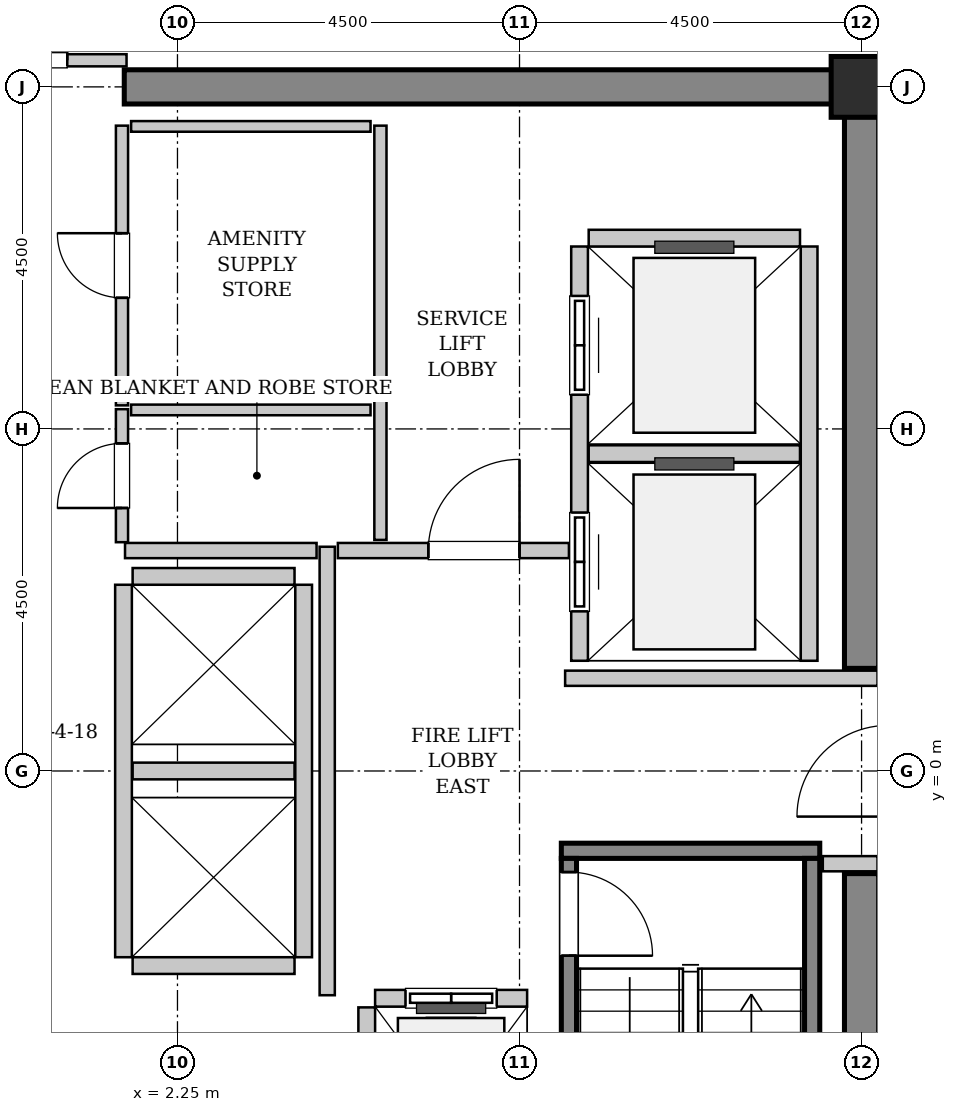
"""IFC4 building model, lengths in metres.
Left out: names, types, materials, properties, quantities, classifications, styles, units other than length and angle.
Written with IfcOpenShell. Run it as: python <this file> out.ifc"""

import sys

from ifc_helpers import new_model, si_unit, direction, frame, frame_2d, origin, origin_2d, place, context, subcontext, project, spatial, rectangle, hollow_rectangle, extrude, source, transform, mapped, element, fill, save


model = new_model("IFC4")
c1 = context("Model", 3, precision=1e-05, world=origin(), true_north=direction((0.0, 1.0)))
c2 = subcontext(c1, "Body", "Model", "MODEL_VIEW")
j1 = project(units=[si_unit("LENGTHUNIT", "METRE"), si_unit("PLANEANGLEUNIT", "RADIAN")], contexts=[c1])
p1 = place(None, origin())
s1 = spatial("IfcSite", under=j1, at=p1, CompositionType="ELEMENT")
p2 = place(p1, origin())
s2 = spatial("IfcBuilding", under=s1, at=p2, CompositionType="ELEMENT")
p3 = place(p2, frame((0.0, 0.0, 252.2)))
s3 = spatial("IfcBuildingStorey", under=s2, at=p3, CompositionType="ELEMENT", Elevation=252.2)
m1 = source(origin(), c2, "Body", "SweptSolid", [
    extrude(rectangle(XDim=9.925, YDim=0.45, at=frame_2d((4.962, 0.0))), origin(), (0.0, 0.0, 1.0), 3.8),
])
p4 = place(p3, frame((1.55, 9.0, 0.0), z_axis=(0.0, 0.0, 1.0), x_axis=(1.0, 0.0, 0.0)))
e1 = element("IfcWall", 1, at=p4, inside=s3, PredefinedType="SHEAR", context=c2, shape_type="MappedRepresentation", body=[
    mapped(m1, transform((0.0, 0.0, 0.0), x_axis=(1.0, 0.0, 0.0), y_axis=(0.0, 1.0, 0.0), z_axis=(0.0, 0.0, 1.0), scale=1.0)),
])
m2 = source(origin(), c2, "Body", "SweptSolid", [
    extrude(rectangle(XDim=7.425, YDim=0.45, at=frame_2d((3.712, 0.0))), origin(), (0.0, 0.0, 1.0), 3.8),
])
for number, where, z_axis, x_axis in (
    (2, (11.25, -8.775, 0.0), (0.0, 0.0, 1.0), (0.0, 1.0, 0.0)),
    (3, (11.25, 1.35, 0.0), (0.0, 0.0, 1.0), (0.0, 1.0, 0.0)),
):
    element("IfcWall", number, at=place(p3, frame(where, z_axis=z_axis, x_axis=x_axis)), inside=s3, PredefinedType="SHEAR", context=c2, shape_type="MappedRepresentation", body=[
        mapped(m2, transform((0.0, 0.0, 0.0), x_axis=(1.0, 0.0, 0.0), y_axis=(0.0, 1.0, 0.0), z_axis=(0.0, 0.0, 1.0), scale=1.0)),
    ])
m3 = source(origin(), c2, "Body", "SweptSolid", [
    extrude(hollow_rectangle(XDim=0.8, YDim=0.8, WallThickness=0.04, InnerFilletRadius=0.04, OuterFilletRadius=0.08, at=origin_2d()), origin(), (0.0, 0.0, 1.0), 3.8),
])
p5 = place(p3, frame((11.25, 9.0, 0.0), z_axis=(0.0, 0.0, 1.0), x_axis=(1.0, 0.0, 0.0)))
e4 = element("IfcColumn", 4, at=p5, inside=s3, PredefinedType="COLUMN", context=c2, shape_type="MappedRepresentation", body=[
    mapped(m3, transform((0.0, 0.0, 0.0), x_axis=(1.0, 0.0, 0.0), y_axis=(0.0, 1.0, 0.0), z_axis=(0.0, 0.0, 1.0), scale=1.0)),
])
m4 = source(origin(), c2, "Body", "SweptSolid", [
    extrude(rectangle(XDim=3.4, YDim=0.2, at=frame_2d((1.7, 0.0))), origin(), (0.0, 0.0, 1.0), 3.8),
])
p6 = place(p3, frame((7.3, -1.05, 0.0), z_axis=(0.0, 0.0, 1.0), x_axis=(1.0, 0.0, 0.0)))
e5 = element("IfcWall", 5, at=p6, inside=s3, PredefinedType="SOLIDWALL", context=c2, shape_type="MappedRepresentation", body=[
    mapped(m4, transform((0.0, 0.0, 0.0), x_axis=(1.0, 0.0, 0.0), y_axis=(0.0, 1.0, 0.0), z_axis=(0.0, 0.0, 1.0), scale=1.0)),
])
m5 = source(origin(), c2, "Body", "SweptSolid", [
    extrude(rectangle(XDim=7.1, YDim=0.2, at=frame_2d((3.55, 0.0))), origin(), (0.0, 0.0, 1.0), 3.8),
])
p7 = place(p3, frame((7.4, -1.15, 0.0), z_axis=(0.0, 0.0, 1.0), x_axis=(0.0, -1.0, 0.0)))
e6 = element("IfcWall", 6, at=p7, inside=s3, PredefinedType="SOLIDWALL", context=c2, shape_type="MappedRepresentation", body=[
    mapped(m5, transform((0.0, 0.0, 0.0), x_axis=(1.0, 0.0, 0.0), y_axis=(0.0, 1.0, 0.0), z_axis=(0.0, 0.0, 1.0), scale=1.0)),
])
p8 = place(p7, frame((0.18, 0.0, 0.0)))
e7 = element("IfcOpeningElement", 7, at=p8, cuts=e6, PredefinedType="OPENING", context=c2, shape_type="SweptSolid", body=[
    extrude(rectangle(XDim=1.1, YDim=2.15, at=frame_2d((0.55, 1.075))), frame((0.0, 0.11, 0.0), z_axis=(0.0, -1.0, 0.0), x_axis=(1.0, 0.0, 0.0)), (0.0, 0.0, 1.0), 0.22),
])
p9 = place(p3, frame((10.6, -1.15, 0.0), z_axis=(0.0, 0.0, 1.0), x_axis=(0.0, -1.0, 0.0)))
e8 = element("IfcWall", 8, at=p9, inside=s3, PredefinedType="SOLIDWALL", context=c2, shape_type="MappedRepresentation", body=[
    mapped(m5, transform((0.0, 0.0, 0.0), x_axis=(1.0, 0.0, 0.0), y_axis=(0.0, 1.0, 0.0), z_axis=(0.0, 0.0, 1.0), scale=1.0)),
])
m6 = source(origin(), c2, "Body", "SweptSolid", [
    extrude(rectangle(XDim=2.0, YDim=0.22, at=frame_2d((1.0, 0.0))), origin(), (0.0, 0.0, 1.0), 3.535),
])
p10 = place(p3, frame((6.85, -2.99, 0.0), z_axis=(0.0, 0.0, 1.0), x_axis=(-1.0, 0.0, 0.0)))
e9 = element("IfcWall", 9, at=p10, inside=s3, PredefinedType="SOLIDWALL", context=c2, shape_type="MappedRepresentation", body=[
    mapped(m6, transform((0.0, 0.0, 0.0), x_axis=(1.0, 0.0, 0.0), y_axis=(0.0, 1.0, 0.0), z_axis=(0.0, 0.0, 1.0), scale=1.0)),
])
p11 = place(p10, frame((0.4, 0.0, 0.0)))
e10 = element("IfcOpeningElement", 10, at=p11, cuts=e9, PredefinedType="OPENING", context=c2, shape_type="SweptSolid", body=[
    extrude(rectangle(XDim=1.2, YDim=2.2, at=frame_2d((0.6, 1.1))), frame((0.0, 0.12, 0.0), z_axis=(0.0, -1.0, 0.0), x_axis=(1.0, 0.0, 0.0)), (0.0, 0.0, 1.0), 0.24),
])
m7 = source(origin(), c2, "Body", "SweptSolid", [
    extrude(rectangle(XDim=2.68, YDim=0.22, at=frame_2d((1.34, 0.0))), origin(), (0.0, 0.0, 1.0), 3.535),
])
p12 = place(p3, frame((4.74, -3.11, 0.0), z_axis=(0.0, 0.0, 1.0), x_axis=(0.0, -1.0, 0.0)))
e11 = element("IfcWall", 11, at=p12, inside=s3, PredefinedType="SOLIDWALL", context=c2, shape_type="MappedRepresentation", body=[
    mapped(m7, transform((0.0, 0.0, 0.0), x_axis=(1.0, 0.0, 0.0), y_axis=(0.0, 1.0, 0.0), z_axis=(0.0, 0.0, 1.0), scale=1.0)),
])
m8 = source(origin(), c2, "Body", "SweptSolid", [
    extrude(rectangle(XDim=5.45, YDim=0.22, at=frame_2d((2.725, 0.0))), origin(), (0.0, 0.0, 1.0), 3.535),
])
p13 = place(p3, frame((7.54, 6.9, 0.0), z_axis=(0.0, 0.0, 1.0), x_axis=(0.0, -1.0, 0.0)))
e12 = element("IfcWall", 12, at=p13, inside=s3, PredefinedType="SOLIDWALL", context=c2, shape_type="MappedRepresentation", body=[
    mapped(m8, transform((0.0, 0.0, 0.0), x_axis=(1.0, 0.0, 0.0), y_axis=(0.0, 1.0, 0.0), z_axis=(0.0, 0.0, 1.0), scale=1.0)),
])
p14 = place(p13, frame((3.5, 0.0, 0.0)))
e13 = element("IfcOpeningElement", 13, at=p14, cuts=e12, PredefinedType="OPENING", context=c2, shape_type="SweptSolid", body=[
    extrude(rectangle(XDim=1.3, YDim=2.3, at=frame_2d((0.65, 1.15))), frame((0.0, 0.12, 0.0), z_axis=(0.0, -1.0, 0.0), x_axis=(1.0, 0.0, 0.0)), (0.0, 0.0, 1.0), 0.24),
])
p15 = place(p13, frame((0.65, 0.0, 0.0)))
e14 = element("IfcOpeningElement", 14, at=p15, cuts=e12, PredefinedType="OPENING", context=c2, shape_type="SweptSolid", body=[
    extrude(rectangle(XDim=1.3, YDim=2.3, at=frame_2d((0.65, 1.15))), frame((0.0, 0.12, 0.0), z_axis=(0.0, -1.0, 0.0), x_axis=(1.0, 0.0, 0.0)), (0.0, 0.0, 1.0), 0.24),
])
p16 = place(p3, frame((10.56, 1.45, 0.0), z_axis=(0.0, 0.0, 1.0), x_axis=(0.0, 1.0, 0.0)))
e15 = element("IfcWall", 15, at=p16, inside=s3, PredefinedType="SOLIDWALL", context=c2, shape_type="MappedRepresentation", body=[
    mapped(m8, transform((0.0, 0.0, 0.0), x_axis=(1.0, 0.0, 0.0), y_axis=(0.0, 1.0, 0.0), z_axis=(0.0, 0.0, 1.0), scale=1.0)),
])
m9 = source(origin(), c2, "Body", "SweptSolid", [
    extrude(rectangle(XDim=2.78, YDim=0.22, at=frame_2d((1.39, 0.0))), origin(), (0.0, 0.0, 1.0), 3.535),
])
for number, where, z_axis, x_axis in (
    (16, (7.66, 4.175, 0.0), (0.0, 0.0, 1.0), (1.0, 0.0, 0.0)),
    (17, (10.44, 7.01, 0.0), (0.0, 0.0, 1.0), (-1.0, 0.0, 0.0)),
):
    element("IfcWall", number, at=place(p3, frame(where, z_axis=z_axis, x_axis=x_axis)), inside=s3, PredefinedType="SOLIDWALL", context=c2, shape_type="MappedRepresentation", body=[
        mapped(m9, transform((0.0, 0.0, 0.0), x_axis=(1.0, 0.0, 0.0), y_axis=(0.0, 1.0, 0.0), z_axis=(0.0, 0.0, 1.0), scale=1.0)),
    ])
m10 = source(origin(), c2, "Body", "SweptSolid", [
    extrude(rectangle(XDim=4.9, YDim=0.22, at=frame_2d((2.45, 0.0))), origin(), (0.0, 0.0, 1.0), 3.535),
])
for number, where, z_axis, x_axis in (
    (18, (1.54, 2.45, 0.0), (0.0, 0.0, 1.0), (0.0, -1.0, 0.0)),
    (19, (3.91, -2.45, 0.0), (0.0, 0.0, 1.0), (0.0, 1.0, 0.0)),
):
    element("IfcWall", number, at=place(p3, frame(where, z_axis=z_axis, x_axis=x_axis)), inside=s3, PredefinedType="SOLIDWALL", context=c2, shape_type="MappedRepresentation", body=[
        mapped(m10, transform((0.0, 0.0, 0.0), x_axis=(1.0, 0.0, 0.0), y_axis=(0.0, 1.0, 0.0), z_axis=(0.0, 0.0, 1.0), scale=1.0)),
    ])
m11 = source(origin(), c2, "Body", "SweptSolid", [
    extrude(rectangle(XDim=2.13, YDim=0.22, at=frame_2d((1.065, 0.0))), origin(), (0.0, 0.0, 1.0), 3.535),
])
for number, where, z_axis, x_axis in (
    (20, (1.66, -2.56, 0.0), (0.0, 0.0, 1.0), (1.0, 0.0, 0.0)),
    (21, (1.66, 0.0, 0.0), (0.0, 0.0, 1.0), (1.0, 0.0, 0.0)),
    (22, (3.79, 2.56, 0.0), (0.0, 0.0, 1.0), (-1.0, 0.0, 0.0)),
):
    element("IfcWall", number, at=place(p3, frame(where, z_axis=z_axis, x_axis=x_axis)), inside=s3, PredefinedType="SOLIDWALL", context=c2, shape_type="MappedRepresentation", body=[
        mapped(m11, transform((0.0, 0.0, 0.0), x_axis=(1.0, 0.0, 0.0), y_axis=(0.0, 1.0, 0.0), z_axis=(0.0, 0.0, 1.0), scale=1.0)),
    ])
m12 = source(origin(), c2, "Body", "SweptSolid", [
    extrude(rectangle(XDim=5.9, YDim=0.2, at=frame_2d((2.95, 0.0))), origin(), (0.0, 0.0, 1.0), 3.535),
])
p17 = place(p3, frame((4.22, -2.95, 0.0), z_axis=(0.0, 0.0, 1.0), x_axis=(0.0, 1.0, 0.0)))
e23 = element("IfcWall", 23, at=p17, inside=s3, PredefinedType="PARTITIONING", context=c2, shape_type="MappedRepresentation", body=[
    mapped(m12, transform((0.0, 0.0, 0.0), x_axis=(1.0, 0.0, 0.0), y_axis=(0.0, 1.0, 0.0), z_axis=(0.0, 0.0, 1.0), scale=1.0)),
])
m13 = source(origin(), c2, "Body", "SweptSolid", [
    extrude(rectangle(XDim=2.52, YDim=0.2, at=frame_2d((1.26, 0.0))), origin(), (0.0, 0.0, 1.0), 3.535),
])
p18 = place(p3, frame((1.56, 2.9, 0.0), z_axis=(0.0, 0.0, 1.0), x_axis=(1.0, 0.0, 0.0)))
e24 = element("IfcWall", 24, at=p18, inside=s3, PredefinedType="PARTITIONING", context=c2, shape_type="MappedRepresentation", body=[
    mapped(m13, transform((0.0, 0.0, 0.0), x_axis=(1.0, 0.0, 0.0), y_axis=(0.0, 1.0, 0.0), z_axis=(0.0, 0.0, 1.0), scale=1.0)),
])
m14 = source(origin(), c2, "Body", "SweptSolid", [
    extrude(rectangle(XDim=3.04, YDim=0.2, at=frame_2d((1.52, 0.0))), origin(), (0.0, 0.0, 1.0), 3.535),
])
p19 = place(p3, frame((4.36, 2.9, 0.0), z_axis=(0.0, 0.0, 1.0), x_axis=(1.0, 0.0, 0.0)))
e25 = element("IfcWall", 25, at=p19, inside=s3, PredefinedType="PARTITIONING", context=c2, shape_type="MappedRepresentation", body=[
    mapped(m14, transform((0.0, 0.0, 0.0), x_axis=(1.0, 0.0, 0.0), y_axis=(0.0, 1.0, 0.0), z_axis=(0.0, 0.0, 1.0), scale=1.0)),
])
p20 = place(p19, frame((1.19, 0.0, 0.0)))
e26 = element("IfcOpeningElement", 26, at=p20, cuts=e25, PredefinedType="OPENING", context=c2, shape_type="SweptSolid", body=[
    extrude(rectangle(XDim=1.2, YDim=2.15, at=frame_2d((0.6, 1.075))), frame((0.0, 0.11, 0.0), z_axis=(0.0, -1.0, 0.0), x_axis=(1.0, 0.0, 0.0)), (0.0, 0.0, 1.0), 0.22),
])
m15 = source(origin(), c2, "Body", "SweptSolid", [
    extrude(rectangle(XDim=4.11, YDim=0.2, at=frame_2d((2.055, 0.0))), origin(), (0.0, 0.0, 1.0), 3.535),
])
p21 = place(p3, frame((7.35, 1.22, 0.0), z_axis=(0.0, 0.0, 1.0), x_axis=(1.0, 0.0, 0.0)))
e27 = element("IfcWall", 27, at=p21, inside=s3, PredefinedType="PARTITIONING", context=c2, shape_type="MappedRepresentation", body=[
    mapped(m15, transform((0.0, 0.0, 0.0), x_axis=(1.0, 0.0, 0.0), y_axis=(0.0, 1.0, 0.0), z_axis=(0.0, 0.0, 1.0), scale=1.0)),
])
m16 = source(origin(), c2, "Body", "SweptSolid", [
    extrude(rectangle(XDim=0.72, YDim=0.2, at=frame_2d((0.36, 0.0))), origin(), (0.0, 0.0, 1.0), 3.535),
])
p22 = place(p3, frame((10.74, -1.22, 0.0), z_axis=(0.0, 0.0, 1.0), x_axis=(1.0, 0.0, 0.0)))
e28 = element("IfcWall", 28, at=p22, inside=s3, PredefinedType="PARTITIONING", context=c2, shape_type="MappedRepresentation", body=[
    mapped(m16, transform((0.0, 0.0, 0.0), x_axis=(1.0, 0.0, 0.0), y_axis=(0.0, 1.0, 0.0), z_axis=(0.0, 0.0, 1.0), scale=1.0)),
])
m17 = source(origin(), c2, "Body", "SweptSolid", [
    extrude(rectangle(XDim=3.16, YDim=0.16, at=frame_2d((1.58, 0.0))), origin(), (0.0, 0.0, 1.0), 2.625),
])
p23 = place(p3, frame((-1.58, 9.35, 0.0), z_axis=(0.0, 0.0, 1.0), x_axis=(1.0, 0.0, 0.0)))
e29 = element("IfcWall", 29, at=p23, inside=s3, PredefinedType="PARTITIONING", context=c2, shape_type="MappedRepresentation", body=[
    mapped(m17, transform((0.0, 0.0, 0.0), x_axis=(1.0, 0.0, 0.0), y_axis=(0.0, 1.0, 0.0), z_axis=(0.0, 0.0, 1.0), scale=1.0)),
])
p24 = place(p23, frame((0.78, 0.0, 0.0)))
e30 = element("IfcOpeningElement", 30, at=p24, cuts=e29, PredefinedType="OPENING", context=c2, shape_type="SweptSolid", body=[
    extrude(rectangle(XDim=1.6, YDim=2.3, at=frame_2d((0.8, 1.15))), frame((0.0, 0.09, 0.0), z_axis=(0.0, -1.0, 0.0), x_axis=(1.0, 0.0, 0.0)), (0.0, 0.0, 1.0), 0.18),
])
m18 = source(origin(), c2, "Body", "SweptSolid", [
    extrude(rectangle(XDim=5.45, YDim=0.16, at=frame_2d((2.725, 0.0))), origin(), (0.0, 0.0, 1.0), 3.535),
])
p25 = place(p3, frame((4.92, 3.04, 0.0), z_axis=(0.0, 0.0, 1.0), x_axis=(0.0, 1.0, 0.0)))
e31 = element("IfcWall", 31, at=p25, inside=s3, PredefinedType="PARTITIONING", context=c2, shape_type="MappedRepresentation", body=[
    mapped(m18, transform((0.0, 0.0, 0.0), x_axis=(1.0, 0.0, 0.0), y_axis=(0.0, 1.0, 0.0), z_axis=(0.0, 0.0, 1.0), scale=1.0)),
])
m19 = source(origin(), c2, "Body", "SweptSolid", [
    extrude(rectangle(XDim=1.75, YDim=0.16, at=frame_2d((0.875, 0.0))), origin(), (0.0, 0.0, 1.0), 3.535),
])
p26 = place(p3, frame((1.52, 3.01, 0.0), z_axis=(0.0, 0.0, 1.0), x_axis=(0.0, 1.0, 0.0)))
e32 = element("IfcWall", 32, at=p26, inside=s3, PredefinedType="PARTITIONING", context=c2, shape_type="MappedRepresentation", body=[
    mapped(m19, transform((0.0, 0.0, 0.0), x_axis=(1.0, 0.0, 0.0), y_axis=(0.0, 1.0, 0.0), z_axis=(0.0, 0.0, 1.0), scale=1.0)),
])
p27 = place(p26, frame((0.45, 0.0, 0.0)))
e33 = element("IfcOpeningElement", 33, at=p27, cuts=e32, PredefinedType="OPENING", context=c2, shape_type="SweptSolid", body=[
    extrude(rectangle(XDim=0.85, YDim=2.1, at=frame_2d((0.425, 1.05))), frame((0.0, 0.09, 0.0), z_axis=(0.0, -1.0, 0.0), x_axis=(1.0, 0.0, 0.0)), (0.0, 0.0, 1.0), 0.18),
])
m20 = source(origin(), c2, "Body", "SweptSolid", [
    extrude(rectangle(XDim=3.15, YDim=0.14, at=frame_2d((1.575, 0.0))), origin(), (0.0, 0.0, 1.0), 3.535),
])
p28 = place(p3, frame((1.64, 4.75, 0.0), z_axis=(0.0, 0.0, 1.0), x_axis=(1.0, 0.0, 0.0)))
e34 = element("IfcWall", 34, at=p28, inside=s3, PredefinedType="PARTITIONING", context=c2, shape_type="MappedRepresentation", body=[
    mapped(m20, transform((0.0, 0.0, 0.0), x_axis=(1.0, 0.0, 0.0), y_axis=(0.0, 1.0, 0.0), z_axis=(0.0, 0.0, 1.0), scale=1.0)),
])
m21 = source(origin(), c2, "Body", "SweptSolid", [
    extrude(rectangle(XDim=3.68, YDim=0.16, at=frame_2d((1.84, 0.0))), origin(), (0.0, 0.0, 1.0), 3.535),
])
p29 = place(p3, frame((1.52, 4.81, 0.0), z_axis=(0.0, 0.0, 1.0), x_axis=(0.0, 1.0, 0.0)))
e35 = element("IfcWall", 35, at=p29, inside=s3, PredefinedType="PARTITIONING", context=c2, shape_type="MappedRepresentation", body=[
    mapped(m21, transform((0.0, 0.0, 0.0), x_axis=(1.0, 0.0, 0.0), y_axis=(0.0, 1.0, 0.0), z_axis=(0.0, 0.0, 1.0), scale=1.0)),
])
p30 = place(p29, frame((1.415, 0.0, 0.0)))
e36 = element("IfcOpeningElement", 36, at=p30, cuts=e35, PredefinedType="OPENING", context=c2, shape_type="SweptSolid", body=[
    extrude(rectangle(XDim=0.85, YDim=2.1, at=frame_2d((0.425, 1.05))), frame((0.0, 0.09, 0.0), z_axis=(0.0, -1.0, 0.0), x_axis=(1.0, 0.0, 0.0)), (0.0, 0.0, 1.0), 0.18),
])
p31 = place(p3, frame((1.64, 8.48, 0.0), z_axis=(0.0, 0.0, 1.0), x_axis=(1.0, 0.0, 0.0)))
e37 = element("IfcWall", 37, at=p31, inside=s3, PredefinedType="PARTITIONING", context=c2, shape_type="MappedRepresentation", body=[
    mapped(m20, transform((0.0, 0.0, 0.0), x_axis=(1.0, 0.0, 0.0), y_axis=(0.0, 1.0, 0.0), z_axis=(0.0, 0.0, 1.0), scale=1.0)),
])
m22 = source(origin(), c2, "Body", "SweptSolid", [
    extrude(rectangle(XDim=1.1, YDim=2.15, at=frame_2d((0.55, 1.075))), frame((0.0, 0.025, 0.0), z_axis=(0.0, -1.0, 0.0), x_axis=(1.0, 0.0, 0.0)), (0.0, 0.0, 1.0), 0.05),
])
p32 = place(p8, origin())
e38 = element("IfcDoor", 38, at=p32, inside=s3, OperationType="SINGLE_SWING_RIGHT", PredefinedType="DOOR", context=c2, shape_type="MappedRepresentation", body=[
    mapped(m22, transform((0.0, 0.0, 0.0), x_axis=(1.0, 0.0, 0.0), y_axis=(0.0, 1.0, 0.0), z_axis=(0.0, 0.0, 1.0), scale=1.0)),
])
fill(e7, e38)
m23 = source(origin(), c2, "Body", "SweptSolid", [
    extrude(rectangle(XDim=1.2, YDim=2.2, at=frame_2d((0.6, 1.1))), frame((0.0, 0.025, 0.0), z_axis=(0.0, -1.0, 0.0), x_axis=(1.0, 0.0, 0.0)), (0.0, 0.0, 1.0), 0.05),
])
p33 = place(p11, origin())
e39 = element("IfcDoor", 39, at=p33, inside=s3, OperationType="SLIDING_TO_LEFT", PredefinedType="DOOR", context=c2, shape_type="MappedRepresentation", body=[
    mapped(m23, transform((0.0, 0.0, 0.0), x_axis=(1.0, 0.0, 0.0), y_axis=(0.0, 1.0, 0.0), z_axis=(0.0, 0.0, 1.0), scale=1.0)),
])
fill(e10, e39)
m24 = source(origin(), c2, "Body", "SweptSolid", [
    extrude(rectangle(XDim=1.3, YDim=2.3, at=frame_2d((0.65, 1.15))), frame((0.0, 0.025, 0.0), z_axis=(0.0, -1.0, 0.0), x_axis=(1.0, 0.0, 0.0)), (0.0, 0.0, 1.0), 0.05),
])
p34 = place(p14, origin())
e40 = element("IfcDoor", 40, at=p34, inside=s3, OperationType="SLIDING_TO_RIGHT", PredefinedType="DOOR", context=c2, shape_type="MappedRepresentation", body=[
    mapped(m24, transform((0.0, 0.0, 0.0), x_axis=(1.0, 0.0, 0.0), y_axis=(0.0, 1.0, 0.0), z_axis=(0.0, 0.0, 1.0), scale=1.0)),
])
fill(e13, e40)
p35 = place(p15, origin())
e41 = element("IfcDoor", 41, at=p35, inside=s3, OperationType="SLIDING_TO_RIGHT", PredefinedType="DOOR", context=c2, shape_type="MappedRepresentation", body=[
    mapped(m24, transform((0.0, 0.0, 0.0), x_axis=(1.0, 0.0, 0.0), y_axis=(0.0, 1.0, 0.0), z_axis=(0.0, 0.0, 1.0), scale=1.0)),
])
fill(e14, e41)
m25 = source(origin(), c2, "Body", "SweptSolid", [
    extrude(rectangle(XDim=1.2, YDim=2.15, at=frame_2d((0.6, 1.075))), frame((0.0, 0.025, 0.0), z_axis=(0.0, -1.0, 0.0), x_axis=(1.0, 0.0, 0.0)), (0.0, 0.0, 1.0), 0.05),
])
p36 = place(p20, origin())
e42 = element("IfcDoor", 42, at=p36, inside=s3, OperationType="SINGLE_SWING_RIGHT", PredefinedType="DOOR", context=c2, shape_type="MappedRepresentation", body=[
    mapped(m25, transform((0.0, 0.0, 0.0), x_axis=(1.0, 0.0, 0.0), y_axis=(0.0, 1.0, 0.0), z_axis=(0.0, 0.0, 1.0), scale=1.0)),
])
fill(e26, e42)
m26 = source(origin(), c2, "Body", "SweptSolid", [
    extrude(rectangle(XDim=1.6, YDim=2.3, at=frame_2d((0.8, 1.15))), frame((0.0, 0.025, 0.0), z_axis=(0.0, -1.0, 0.0), x_axis=(1.0, 0.0, 0.0)), (0.0, 0.0, 1.0), 0.05),
])
p37 = place(p24, origin())
e43 = element("IfcDoor", 43, at=p37, inside=s3, OperationType="DOUBLE_DOOR_SINGLE_SWING", PredefinedType="DOOR", context=c2, shape_type="MappedRepresentation", body=[
    mapped(m26, transform((0.0, 0.0, 0.0), x_axis=(1.0, 0.0, 0.0), y_axis=(0.0, 1.0, 0.0), z_axis=(0.0, 0.0, 1.0), scale=1.0)),
])
fill(e30, e43)
m27 = source(origin(), c2, "Body", "SweptSolid", [
    extrude(rectangle(XDim=0.85, YDim=2.1, at=frame_2d((0.425, 1.05))), frame((0.0, 0.025, 0.0), z_axis=(0.0, -1.0, 0.0), x_axis=(1.0, 0.0, 0.0)), (0.0, 0.0, 1.0), 0.05),
])
p38 = place(p27, origin())
e44 = element("IfcDoor", 44, at=p38, inside=s3, OperationType="SINGLE_SWING_LEFT", PredefinedType="DOOR", context=c2, shape_type="MappedRepresentation", body=[
    mapped(m27, transform((0.0, 0.0, 0.0), x_axis=(1.0, 0.0, 0.0), y_axis=(0.0, 1.0, 0.0), z_axis=(0.0, 0.0, 1.0), scale=1.0)),
])
fill(e33, e44)
p39 = place(p30, origin())
e45 = element("IfcDoor", 45, at=p39, inside=s3, OperationType="SINGLE_SWING_RIGHT", PredefinedType="DOOR", context=c2, shape_type="MappedRepresentation", body=[
    mapped(m27, transform((0.0, 0.0, 0.0), x_axis=(1.0, 0.0, 0.0), y_axis=(0.0, 1.0, 0.0), z_axis=(0.0, 0.0, 1.0), scale=1.0)),
])
fill(e36, e45)
save(model, sys.argv[1])
